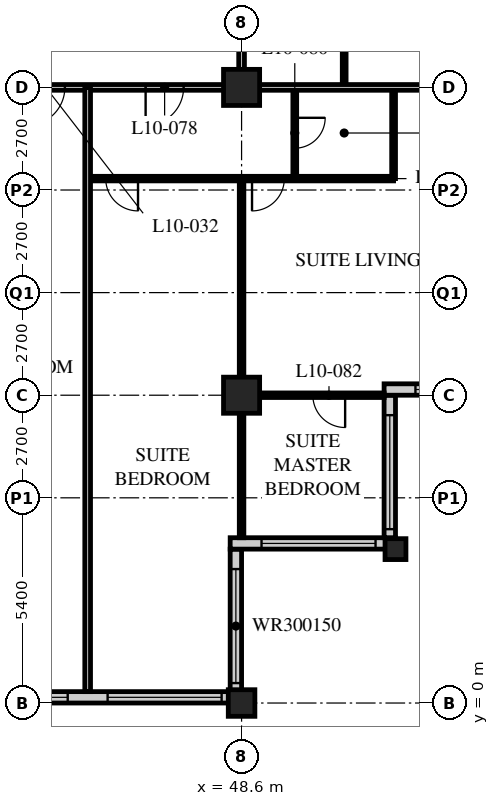
"""IFC4 building model, lengths in metres.
Left out: names, types, materials, properties, quantities, classifications, styles, units other than length and angle.
Written with IfcOpenShell. Run it as: python <this file> out.ifc"""

import sys

from ifc_helpers import new_model, si_unit, direction, frame, frame_2d, origin, origin_2d, place, context, subcontext, project, spatial, rectangle, hollow_rectangle, extrude, element, fill, save


model = new_model("IFC4")
c1 = context("Model", 3, precision=1e-05, world=origin(), true_north=direction((0.0, 1.0)))
c2 = subcontext(c1, "Body", "Model", "MODEL_VIEW")
j1 = project(units=[si_unit("LENGTHUNIT", "METRE"), si_unit("PLANEANGLEUNIT", "RADIAN")], contexts=[c1])
p1 = place(None, origin())
s1 = spatial("IfcSite", under=j1, at=p1, CompositionType="ELEMENT")
p2 = place(p1, origin())
s2 = spatial("IfcBuilding", under=s1, at=p2, CompositionType="ELEMENT")
p3 = place(p2, frame((0.0, 0.0, 46.6)))
s3 = spatial("IfcBuildingStorey", under=s2, at=p3, CompositionType="ELEMENT", Elevation=46.6)
p4 = place(p3, frame((48.6, 0.0, 0.0), z_axis=(0.0, 0.0, 1.0), x_axis=(1.0, 0.0, 0.0)))
e1 = element("IfcColumn", 1, at=p4, inside=s3, PredefinedType="COLUMN", context=c2, shape_type="SweptSolid", body=[
    extrude(hollow_rectangle(XDim=0.7, YDim=0.7, WallThickness=0.06, at=origin_2d()), origin(), (0.0, 0.0, 1.0), 3.4),
])
for number, where, z_axis, x_axis in (
    (2, (48.6, 8.1, 0.0), (0.0, 0.0, 1.0), (1.0, 0.0, 0.0)),
    (3, (48.6, 16.2, 0.0), (0.0, 0.0, 1.0), (1.0, 0.0, 0.0)),
):
    element("IfcColumn", number, at=place(p3, frame(where, z_axis=z_axis, x_axis=x_axis)), inside=s3, PredefinedType="COLUMN", context=c2, shape_type="SweptSolid", body=[
        extrude(hollow_rectangle(XDim=0.95, YDim=0.95, WallThickness=0.095, at=origin_2d()), origin(), (0.0, 0.0, 1.0), 3.4),
    ])
p5 = place(p3, frame((52.65, 4.05, 0.0), z_axis=(0.0, 0.0, 1.0), x_axis=(1.0, 0.0, 0.0)))
e4 = element("IfcColumn", 4, at=p5, inside=s3, PredefinedType="COLUMN", context=c2, shape_type="SweptSolid", body=[
    extrude(hollow_rectangle(XDim=0.55, YDim=0.55, WallThickness=0.05, at=origin_2d()), origin(), (0.0, 0.0, 1.0), 3.4),
])
p6 = place(p3, frame((8.4, 0.15, 0.0), z_axis=(0.0, 0.0, 1.0), x_axis=(1.0, 0.0, 0.0)))
e5 = element("IfcWall", 5, at=p6, inside=s3, PredefinedType="SOLIDWALL", context=c2, shape_type="SweptSolid", body=[
    extrude(rectangle(XDim=40.2, YDim=0.3, at=frame_2d((20.1, 0.0))), origin(), (0.0, 0.0, 1.0), 3.19),
])
p7 = place(p6, frame((0.225, 0.0, 0.9)))
e6 = element("IfcOpeningElement", 6, at=p7, cuts=e5, PredefinedType="OPENING", context=c2, shape_type="SweptSolid", body=[
    extrude(rectangle(XDim=3.0, YDim=2.0, at=frame_2d((1.5, 1.0))), frame((0.0, 0.16, 0.0), z_axis=(0.0, -1.0, 0.0), x_axis=(1.0, 0.0, 0.0)), (0.0, 0.0, 1.0), 0.32),
])
p8 = place(p6, frame((4.275, 0.0, 0.9)))
e7 = element("IfcOpeningElement", 7, at=p8, cuts=e5, PredefinedType="OPENING", context=c2, shape_type="SweptSolid", body=[
    extrude(rectangle(XDim=3.0, YDim=2.0, at=frame_2d((1.5, 1.0))), frame((0.0, 0.16, 0.0), z_axis=(0.0, -1.0, 0.0), x_axis=(1.0, 0.0, 0.0)), (0.0, 0.0, 1.0), 0.32),
])
p9 = place(p6, frame((8.325, 0.0, 0.9)))
e8 = element("IfcOpeningElement", 8, at=p9, cuts=e5, PredefinedType="OPENING", context=c2, shape_type="SweptSolid", body=[
    extrude(rectangle(XDim=3.0, YDim=2.0, at=frame_2d((1.5, 1.0))), frame((0.0, 0.16, 0.0), z_axis=(0.0, -1.0, 0.0), x_axis=(1.0, 0.0, 0.0)), (0.0, 0.0, 1.0), 0.32),
])
p10 = place(p6, frame((12.375, 0.0, 0.9)))
e9 = element("IfcOpeningElement", 9, at=p10, cuts=e5, PredefinedType="OPENING", context=c2, shape_type="SweptSolid", body=[
    extrude(rectangle(XDim=3.0, YDim=2.0, at=frame_2d((1.5, 1.0))), frame((0.0, 0.16, 0.0), z_axis=(0.0, -1.0, 0.0), x_axis=(1.0, 0.0, 0.0)), (0.0, 0.0, 1.0), 0.32),
])
p11 = place(p6, frame((16.425, 0.0, 0.9)))
e10 = element("IfcOpeningElement", 10, at=p11, cuts=e5, PredefinedType="OPENING", context=c2, shape_type="SweptSolid", body=[
    extrude(rectangle(XDim=3.0, YDim=2.0, at=frame_2d((1.5, 1.0))), frame((0.0, 0.16, 0.0), z_axis=(0.0, -1.0, 0.0), x_axis=(1.0, 0.0, 0.0)), (0.0, 0.0, 1.0), 0.32),
])
p12 = place(p6, frame((20.475, 0.0, 0.9)))
e11 = element("IfcOpeningElement", 11, at=p12, cuts=e5, PredefinedType="OPENING", context=c2, shape_type="SweptSolid", body=[
    extrude(rectangle(XDim=3.0, YDim=2.0, at=frame_2d((1.5, 1.0))), frame((0.0, 0.16, 0.0), z_axis=(0.0, -1.0, 0.0), x_axis=(1.0, 0.0, 0.0)), (0.0, 0.0, 1.0), 0.32),
])
p13 = place(p6, frame((24.525, 0.0, 0.9)))
e12 = element("IfcOpeningElement", 12, at=p13, cuts=e5, PredefinedType="OPENING", context=c2, shape_type="SweptSolid", body=[
    extrude(rectangle(XDim=3.0, YDim=2.0, at=frame_2d((1.5, 1.0))), frame((0.0, 0.16, 0.0), z_axis=(0.0, -1.0, 0.0), x_axis=(1.0, 0.0, 0.0)), (0.0, 0.0, 1.0), 0.32),
])
p14 = place(p6, frame((28.575, 0.0, 0.9)))
e13 = element("IfcOpeningElement", 13, at=p14, cuts=e5, PredefinedType="OPENING", context=c2, shape_type="SweptSolid", body=[
    extrude(rectangle(XDim=3.0, YDim=2.0, at=frame_2d((1.5, 1.0))), frame((0.0, 0.16, 0.0), z_axis=(0.0, -1.0, 0.0), x_axis=(1.0, 0.0, 0.0)), (0.0, 0.0, 1.0), 0.32),
])
p15 = place(p6, frame((32.625, 0.0, 0.9)))
e14 = element("IfcOpeningElement", 14, at=p15, cuts=e5, PredefinedType="OPENING", context=c2, shape_type="SweptSolid", body=[
    extrude(rectangle(XDim=3.0, YDim=2.0, at=frame_2d((1.5, 1.0))), frame((0.0, 0.16, 0.0), z_axis=(0.0, -1.0, 0.0), x_axis=(1.0, 0.0, 0.0)), (0.0, 0.0, 1.0), 0.32),
])
p16 = place(p6, frame((36.675, 0.0, 0.9)))
e15 = element("IfcOpeningElement", 15, at=p16, cuts=e5, PredefinedType="OPENING", context=c2, shape_type="SweptSolid", body=[
    extrude(rectangle(XDim=3.0, YDim=2.0, at=frame_2d((1.5, 1.0))), frame((0.0, 0.16, 0.0), z_axis=(0.0, -1.0, 0.0), x_axis=(1.0, 0.0, 0.0)), (0.0, 0.0, 1.0), 0.32),
])
p17 = place(p3, frame((48.45, 0.3, 0.0), z_axis=(0.0, 0.0, 1.0), x_axis=(0.0, 1.0, 0.0)))
e16 = element("IfcWall", 16, at=p17, inside=s3, PredefinedType="SOLIDWALL", context=c2, shape_type="SweptSolid", body=[
    extrude(rectangle(XDim=3.75, YDim=0.3, at=frame_2d((1.875, 0.0))), origin(), (0.0, 0.0, 1.0), 3.19),
])
p18 = place(p17, frame((0.225, 0.0, 0.9)))
e17 = element("IfcOpeningElement", 17, at=p18, cuts=e16, PredefinedType="OPENING", context=c2, shape_type="SweptSolid", body=[
    extrude(rectangle(XDim=3.0, YDim=1.5, at=frame_2d((1.5, 0.75))), frame((0.0, 0.16, 0.0), z_axis=(0.0, -1.0, 0.0), x_axis=(1.0, 0.0, 0.0)), (0.0, 0.0, 1.0), 0.32),
])
p19 = place(p3, frame((48.3, 4.2, 0.0), z_axis=(0.0, 0.0, 1.0), x_axis=(1.0, 0.0, 0.0)))
e18 = element("IfcWall", 18, at=p19, inside=s3, PredefinedType="SOLIDWALL", context=c2, shape_type="SweptSolid", body=[
    extrude(rectangle(XDim=4.35, YDim=0.3, at=frame_2d((2.175, 0.0))), origin(), (0.0, 0.0, 1.0), 3.19),
])
p20 = place(p19, frame((0.825, 0.0, 0.9)))
e19 = element("IfcOpeningElement", 19, at=p20, cuts=e18, PredefinedType="OPENING", context=c2, shape_type="SweptSolid", body=[
    extrude(rectangle(XDim=3.0, YDim=1.5, at=frame_2d((1.5, 0.75))), frame((0.0, 0.16, 0.0), z_axis=(0.0, -1.0, 0.0), x_axis=(1.0, 0.0, 0.0)), (0.0, 0.0, 1.0), 0.32),
])
p21 = place(p3, frame((52.5, 4.35, 0.0), z_axis=(0.0, 0.0, 1.0), x_axis=(0.0, 1.0, 0.0)))
e20 = element("IfcWall", 20, at=p21, inside=s3, PredefinedType="SOLIDWALL", context=c2, shape_type="SweptSolid", body=[
    extrude(rectangle(XDim=3.75, YDim=0.3, at=frame_2d((1.875, 0.0))), origin(), (0.0, 0.0, 1.0), 3.19),
])
p22 = place(p21, frame((0.225, 0.0, 0.9)))
e21 = element("IfcOpeningElement", 21, at=p22, cuts=e20, PredefinedType="OPENING", context=c2, shape_type="SweptSolid", body=[
    extrude(rectangle(XDim=3.0, YDim=1.5, at=frame_2d((1.5, 0.75))), frame((0.0, 0.16, 0.0), z_axis=(0.0, -1.0, 0.0), x_axis=(1.0, 0.0, 0.0)), (0.0, 0.0, 1.0), 0.32),
])
p23 = place(p3, frame((52.35, 8.25, 0.0), z_axis=(0.0, 0.0, 1.0), x_axis=(1.0, 0.0, 0.0)))
e22 = element("IfcWall", 22, at=p23, inside=s3, PredefinedType="SOLIDWALL", context=c2, shape_type="SweptSolid", body=[
    extrude(rectangle(XDim=4.35, YDim=0.3, at=frame_2d((2.175, 0.0))), origin(), (0.0, 0.0, 1.0), 3.19),
])
p24 = place(p23, frame((0.825, 0.0, 0.9)))
e23 = element("IfcOpeningElement", 23, at=p24, cuts=e22, PredefinedType="OPENING", context=c2, shape_type="SweptSolid", body=[
    extrude(rectangle(XDim=3.0, YDim=1.5, at=frame_2d((1.5, 0.75))), frame((0.0, 0.16, 0.0), z_axis=(0.0, -1.0, 0.0), x_axis=(1.0, 0.0, 0.0)), (0.0, 0.0, 1.0), 0.32),
])
p25 = place(p3, frame((8.1, 16.2, 0.0), z_axis=(0.0, 0.0, 1.0), x_axis=(1.0, 0.0, 0.0)))
e24 = element("IfcWall", 24, at=p25, inside=s3, PredefinedType="PARTITIONING", context=c2, shape_type="SweptSolid", body=[
    extrude(rectangle(XDim=40.5, YDim=0.15, at=frame_2d((20.25, 0.0))), origin(), (0.0, 0.0, 1.0), 2.578),
])
p26 = place(p25, frame((4.35, 0.0, 0.0)))
e25 = element("IfcOpeningElement", 25, at=p26, cuts=e24, PredefinedType="OPENING", context=c2, shape_type="SweptSolid", body=[
    extrude(rectangle(XDim=1.0, YDim=2.1, at=frame_2d((0.5, 1.05))), frame((0.0, 0.085, 0.0), z_axis=(0.0, -1.0, 0.0), x_axis=(1.0, 0.0, 0.0)), (0.0, 0.0, 1.0), 0.17),
])
p27 = place(p25, frame((10.85, 0.0, 0.0)))
e26 = element("IfcOpeningElement", 26, at=p27, cuts=e24, PredefinedType="OPENING", context=c2, shape_type="SweptSolid", body=[
    extrude(rectangle(XDim=1.0, YDim=2.1, at=frame_2d((0.5, 1.05))), frame((0.0, 0.085, 0.0), z_axis=(0.0, -1.0, 0.0), x_axis=(1.0, 0.0, 0.0)), (0.0, 0.0, 1.0), 0.17),
])
p28 = place(p25, frame((12.75, 0.0, 0.0)))
e27 = element("IfcOpeningElement", 27, at=p28, cuts=e24, PredefinedType="OPENING", context=c2, shape_type="SweptSolid", body=[
    extrude(rectangle(XDim=1.0, YDim=2.1, at=frame_2d((0.5, 1.05))), frame((0.0, 0.085, 0.0), z_axis=(0.0, -1.0, 0.0), x_axis=(1.0, 0.0, 0.0)), (0.0, 0.0, 1.0), 0.17),
])
p29 = place(p25, frame((18.95, 0.0, 0.0)))
e28 = element("IfcOpeningElement", 28, at=p29, cuts=e24, PredefinedType="OPENING", context=c2, shape_type="SweptSolid", body=[
    extrude(rectangle(XDim=1.0, YDim=2.1, at=frame_2d((0.5, 1.05))), frame((0.0, 0.085, 0.0), z_axis=(0.0, -1.0, 0.0), x_axis=(1.0, 0.0, 0.0)), (0.0, 0.0, 1.0), 0.17),
])
p30 = place(p25, frame((20.55, 0.0, 0.0)))
e29 = element("IfcOpeningElement", 29, at=p30, cuts=e24, PredefinedType="OPENING", context=c2, shape_type="SweptSolid", body=[
    extrude(rectangle(XDim=1.0, YDim=2.1, at=frame_2d((0.5, 1.05))), frame((0.0, 0.085, 0.0), z_axis=(0.0, -1.0, 0.0), x_axis=(1.0, 0.0, 0.0)), (0.0, 0.0, 1.0), 0.17),
])
p31 = place(p25, frame((27.05, 0.0, 0.0)))
e30 = element("IfcOpeningElement", 30, at=p31, cuts=e24, PredefinedType="OPENING", context=c2, shape_type="SweptSolid", body=[
    extrude(rectangle(XDim=1.0, YDim=2.1, at=frame_2d((0.5, 1.05))), frame((0.0, 0.085, 0.0), z_axis=(0.0, -1.0, 0.0), x_axis=(1.0, 0.0, 0.0)), (0.0, 0.0, 1.0), 0.17),
])
p32 = place(p25, frame((28.95, 0.0, 0.0)))
e31 = element("IfcOpeningElement", 31, at=p32, cuts=e24, PredefinedType="OPENING", context=c2, shape_type="SweptSolid", body=[
    extrude(rectangle(XDim=1.0, YDim=2.1, at=frame_2d((0.5, 1.05))), frame((0.0, 0.085, 0.0), z_axis=(0.0, -1.0, 0.0), x_axis=(1.0, 0.0, 0.0)), (0.0, 0.0, 1.0), 0.17),
])
p33 = place(p25, frame((34.85, 0.0, 0.0)))
e32 = element("IfcOpeningElement", 32, at=p33, cuts=e24, PredefinedType="OPENING", context=c2, shape_type="SweptSolid", body=[
    extrude(rectangle(XDim=1.0, YDim=2.1, at=frame_2d((0.5, 1.05))), frame((0.0, 0.085, 0.0), z_axis=(0.0, -1.0, 0.0), x_axis=(1.0, 0.0, 0.0)), (0.0, 0.0, 1.0), 0.17),
])
p34 = place(p25, frame((1.525, 0.0, 0.0)))
e33 = element("IfcOpeningElement", 33, at=p34, cuts=e24, PredefinedType="OPENING", context=c2, shape_type="SweptSolid", body=[
    extrude(rectangle(XDim=1.0, YDim=2.1, at=frame_2d((0.5, 1.05))), frame((0.0, 0.085, 0.0), z_axis=(0.0, -1.0, 0.0), x_axis=(1.0, 0.0, 0.0)), (0.0, 0.0, 1.0), 0.17),
])
p35 = place(p25, frame((37.975, 0.0, 0.0)))
e34 = element("IfcOpeningElement", 34, at=p35, cuts=e24, PredefinedType="OPENING", context=c2, shape_type="SweptSolid", body=[
    extrude(rectangle(XDim=1.0, YDim=2.1, at=frame_2d((0.5, 1.05))), frame((0.0, 0.085, 0.0), z_axis=(0.0, -1.0, 0.0), x_axis=(1.0, 0.0, 0.0)), (0.0, 0.0, 1.0), 0.17),
])
p36 = place(p3, frame((48.6, 16.2, 0.0), z_axis=(0.0, 0.0, 1.0), x_axis=(0.0, 1.0, 0.0)))
e35 = element("IfcWall", 35, at=p36, inside=s3, PredefinedType="PARTITIONING", context=c2, shape_type="SweptSolid", body=[
    extrude(rectangle(XDim=26.1, YDim=0.15, at=frame_2d((13.05, 0.0))), origin(), (0.0, 0.0, 1.0), 2.578),
])
p37 = place(p36, frame((2.75, 0.0, 0.0)))
e36 = element("IfcOpeningElement", 36, at=p37, cuts=e35, PredefinedType="OPENING", context=c2, shape_type="SweptSolid", body=[
    extrude(rectangle(XDim=1.0, YDim=2.1, at=frame_2d((0.5, 1.05))), frame((0.0, 0.085, 0.0), z_axis=(0.0, -1.0, 0.0), x_axis=(1.0, 0.0, 0.0)), (0.0, 0.0, 1.0), 0.17),
])
p38 = place(p36, frame((4.35, 0.0, 0.0)))
e37 = element("IfcOpeningElement", 37, at=p38, cuts=e35, PredefinedType="OPENING", context=c2, shape_type="SweptSolid", body=[
    extrude(rectangle(XDim=1.0, YDim=2.1, at=frame_2d((0.5, 1.05))), frame((0.0, 0.085, 0.0), z_axis=(0.0, -1.0, 0.0), x_axis=(1.0, 0.0, 0.0)), (0.0, 0.0, 1.0), 0.17),
])
p39 = place(p36, frame((10.85, 0.0, 0.0)))
e38 = element("IfcOpeningElement", 38, at=p39, cuts=e35, PredefinedType="OPENING", context=c2, shape_type="SweptSolid", body=[
    extrude(rectangle(XDim=1.0, YDim=2.1, at=frame_2d((0.5, 1.05))), frame((0.0, 0.085, 0.0), z_axis=(0.0, -1.0, 0.0), x_axis=(1.0, 0.0, 0.0)), (0.0, 0.0, 1.0), 0.17),
])
p40 = place(p36, frame((12.45, 0.0, 0.0)))
e39 = element("IfcOpeningElement", 39, at=p40, cuts=e35, PredefinedType="OPENING", context=c2, shape_type="SweptSolid", body=[
    extrude(rectangle(XDim=1.0, YDim=2.1, at=frame_2d((0.5, 1.05))), frame((0.0, 0.085, 0.0), z_axis=(0.0, -1.0, 0.0), x_axis=(1.0, 0.0, 0.0)), (0.0, 0.0, 1.0), 0.17),
])
p41 = place(p36, frame((18.65, 0.0, 0.0)))
e40 = element("IfcOpeningElement", 40, at=p41, cuts=e35, PredefinedType="OPENING", context=c2, shape_type="SweptSolid", body=[
    extrude(rectangle(XDim=1.0, YDim=2.1, at=frame_2d((0.5, 1.05))), frame((0.0, 0.085, 0.0), z_axis=(0.0, -1.0, 0.0), x_axis=(1.0, 0.0, 0.0)), (0.0, 0.0, 1.0), 0.17),
])
p42 = place(p36, frame((22.7, 0.0, 0.0)))
e41 = element("IfcOpeningElement", 41, at=p42, cuts=e35, PredefinedType="OPENING", context=c2, shape_type="SweptSolid", body=[
    extrude(rectangle(XDim=1.0, YDim=2.1, at=frame_2d((0.5, 1.05))), frame((0.0, 0.085, 0.0), z_axis=(0.0, -1.0, 0.0), x_axis=(1.0, 0.0, 0.0)), (0.0, 0.0, 1.0), 0.17),
])
p43 = place(p3, frame((51.3, 16.2, 0.0), z_axis=(0.0, 0.0, 1.0), x_axis=(0.0, 1.0, 0.0)))
e42 = element("IfcWall", 42, at=p43, inside=s3, PredefinedType="PARTITIONING", context=c2, shape_type="SweptSolid", body=[
    extrude(rectangle(XDim=2.6, YDim=0.1, at=frame_2d((1.3, 0.0))), origin(), (0.0, 0.0, 1.0), 3.19),
])
p44 = place(p3, frame((44.55, 13.8, 0.0), z_axis=(0.0, 0.0, 1.0), x_axis=(1.0, 0.0, 0.0)))
e43 = element("IfcWall", 43, at=p44, inside=s3, PredefinedType="PARTITIONING", context=c2, shape_type="SweptSolid", body=[
    extrude(rectangle(XDim=8.05, YDim=0.12, at=frame_2d((4.025, 0.0))), origin(), (0.0, 0.0, 1.0), 3.19),
])
p45 = place(p44, frame((0.475, 0.0, 0.0)))
e44 = element("IfcOpeningElement", 44, at=p45, cuts=e43, PredefinedType="OPENING", context=c2, shape_type="SweptSolid", body=[
    extrude(rectangle(XDim=0.85, YDim=2.1, at=frame_2d((0.425, 1.05))), frame((0.0, 0.07, 0.0), z_axis=(0.0, -1.0, 0.0), x_axis=(1.0, 0.0, 0.0)), (0.0, 0.0, 1.0), 0.14),
])
p46 = place(p44, frame((4.325, 0.0, 0.0)))
e45 = element("IfcOpeningElement", 45, at=p46, cuts=e43, PredefinedType="OPENING", context=c2, shape_type="SweptSolid", body=[
    extrude(rectangle(XDim=0.85, YDim=2.1, at=frame_2d((0.425, 1.05))), frame((0.0, 0.07, 0.0), z_axis=(0.0, -1.0, 0.0), x_axis=(1.0, 0.0, 0.0)), (0.0, 0.0, 1.0), 0.14),
])
p47 = place(p3, frame((50.0, 16.2, 0.0), z_axis=(0.0, 0.0, 1.0), x_axis=(0.0, -1.0, 0.0)))
e46 = element("IfcWall", 46, at=p47, inside=s3, PredefinedType="PARTITIONING", context=c2, shape_type="SweptSolid", body=[
    extrude(rectangle(XDim=2.4, YDim=0.1, at=frame_2d((1.2, 0.0))), origin(), (0.0, 0.0, 1.0), 3.19),
])
p48 = place(p47, frame((0.8, 0.0, 0.0)))
e47 = element("IfcOpeningElement", 47, at=p48, cuts=e46, PredefinedType="OPENING", context=c2, shape_type="SweptSolid", body=[
    extrude(rectangle(XDim=0.8, YDim=2.1, at=frame_2d((0.4, 1.05))), frame((0.0, 0.06, 0.0), z_axis=(0.0, -1.0, 0.0), x_axis=(1.0, 0.0, 0.0)), (0.0, 0.0, 1.0), 0.12),
])
p49 = place(p3, frame((52.6, 16.2, 0.0), z_axis=(0.0, 0.0, 1.0), x_axis=(0.0, -1.0, 0.0)))
e48 = element("IfcWall", 48, at=p49, inside=s3, PredefinedType="PARTITIONING", context=c2, shape_type="SweptSolid", body=[
    extrude(rectangle(XDim=2.4, YDim=0.1, at=frame_2d((1.2, 0.0))), origin(), (0.0, 0.0, 1.0), 3.19),
])
p50 = place(p3, frame((48.6, 13.8, 0.0), z_axis=(0.0, 0.0, 1.0), x_axis=(0.0, -1.0, 0.0)))
e49 = element("IfcWall", 49, at=p50, inside=s3, PredefinedType="PARTITIONING", context=c2, shape_type="SweptSolid", body=[
    extrude(rectangle(XDim=9.45, YDim=0.12, at=frame_2d((4.725, 0.0))), origin(), (0.0, 0.0, 1.0), 2.578),
])
p51 = place(p3, frame((48.6, 8.1, 0.0), z_axis=(0.0, 0.0, 1.0), x_axis=(1.0, 0.0, 0.0)))
e50 = element("IfcWall", 50, at=p51, inside=s3, PredefinedType="PARTITIONING", context=c2, shape_type="SweptSolid", body=[
    extrude(rectangle(XDim=3.75, YDim=0.12, at=frame_2d((1.875, 0.0))), origin(), (0.0, 0.0, 1.0), 2.578),
])
p52 = place(p51, frame((1.875, 0.0, 0.0)))
e51 = element("IfcOpeningElement", 51, at=p52, cuts=e50, PredefinedType="OPENING", context=c2, shape_type="SweptSolid", body=[
    extrude(rectangle(XDim=0.85, YDim=2.1, at=frame_2d((0.425, 1.05))), frame((0.0, 0.07, 0.0), z_axis=(0.0, -1.0, 0.0), x_axis=(1.0, 0.0, 0.0)), (0.0, 0.0, 1.0), 0.14),
])
p53 = place(p3, frame((48.6, 16.2, 0.0), z_axis=(0.0, 0.0, 1.0), x_axis=(1.0, 0.0, 0.0)))
e52 = element("IfcWall", 52, at=p53, inside=s3, PredefinedType="PARTITIONING", context=c2, shape_type="SweptSolid", body=[
    extrude(rectangle(XDim=7.8, YDim=0.15, at=frame_2d((3.9, 0.0))), origin(), (0.0, 0.0, 1.0), 2.578),
])
p54 = place(p3, frame((44.55, 16.2, 0.0), z_axis=(0.0, 0.0, 1.0), x_axis=(0.0, -1.0, 0.0)))
e53 = element("IfcWall", 53, at=p54, inside=s3, PredefinedType="PARTITIONING", context=c2, shape_type="SweptSolid", body=[
    extrude(rectangle(XDim=15.9, YDim=0.15, at=frame_2d((7.95, 0.0))), origin(), (0.0, 0.0, 1.0), 3.19),
])
p55 = place(p15, origin())
e54 = element("IfcWindow", 54, at=p55, inside=s3, PartitioningType="SINGLE_PANEL", PredefinedType="WINDOW", context=c2, shape_type="SweptSolid", body=[
    extrude(rectangle(XDim=3.0, YDim=2.0, at=frame_2d((1.5, 1.0))), frame((0.0, 0.03, 0.0), z_axis=(0.0, -1.0, 0.0), x_axis=(1.0, 0.0, 0.0)), (0.0, 0.0, 1.0), 0.06),
])
fill(e14, e54)
p56 = place(p16, origin())
e55 = element("IfcWindow", 55, at=p56, inside=s3, PartitioningType="SINGLE_PANEL", PredefinedType="WINDOW", context=c2, shape_type="SweptSolid", body=[
    extrude(rectangle(XDim=3.0, YDim=2.0, at=frame_2d((1.5, 1.0))), frame((0.0, 0.03, 0.0), z_axis=(0.0, -1.0, 0.0), x_axis=(1.0, 0.0, 0.0)), (0.0, 0.0, 1.0), 0.06),
])
fill(e15, e55)
p57 = place(p18, origin())
e56 = element("IfcWindow", 56, at=p57, inside=s3, PartitioningType="SINGLE_PANEL", PredefinedType="WINDOW", context=c2, shape_type="SweptSolid", body=[
    extrude(rectangle(XDim=3.0, YDim=1.5, at=frame_2d((1.5, 0.75))), frame((0.0, 0.03, 0.0), z_axis=(0.0, -1.0, 0.0), x_axis=(1.0, 0.0, 0.0)), (0.0, 0.0, 1.0), 0.06),
])
fill(e17, e56)
p58 = place(p20, origin())
e57 = element("IfcWindow", 57, at=p58, inside=s3, PartitioningType="SINGLE_PANEL", PredefinedType="WINDOW", context=c2, shape_type="SweptSolid", body=[
    extrude(rectangle(XDim=3.0, YDim=1.5, at=frame_2d((1.5, 0.75))), frame((0.0, 0.03, 0.0), z_axis=(0.0, -1.0, 0.0), x_axis=(1.0, 0.0, 0.0)), (0.0, 0.0, 1.0), 0.06),
])
fill(e19, e57)
p59 = place(p22, origin())
e58 = element("IfcWindow", 58, at=p59, inside=s3, PartitioningType="SINGLE_PANEL", PredefinedType="WINDOW", context=c2, shape_type="SweptSolid", body=[
    extrude(rectangle(XDim=3.0, YDim=1.5, at=frame_2d((1.5, 0.75))), frame((0.0, 0.03, 0.0), z_axis=(0.0, -1.0, 0.0), x_axis=(1.0, 0.0, 0.0)), (0.0, 0.0, 1.0), 0.06),
])
fill(e21, e58)
p60 = place(p24, origin())
e59 = element("IfcWindow", 59, at=p60, inside=s3, PartitioningType="SINGLE_PANEL", PredefinedType="WINDOW", context=c2, shape_type="SweptSolid", body=[
    extrude(rectangle(XDim=3.0, YDim=1.5, at=frame_2d((1.5, 0.75))), frame((0.0, 0.03, 0.0), z_axis=(0.0, -1.0, 0.0), x_axis=(1.0, 0.0, 0.0)), (0.0, 0.0, 1.0), 0.06),
])
fill(e23, e59)
p61 = place(p33, origin())
e60 = element("IfcDoor", 60, at=p61, inside=s3, OperationType="SINGLE_SWING_RIGHT", PredefinedType="DOOR", context=c2, shape_type="SweptSolid", body=[
    extrude(rectangle(XDim=1.0, YDim=2.1, at=frame_2d((0.5, 1.05))), frame((0.0, 0.025, 0.0), z_axis=(0.0, -1.0, 0.0), x_axis=(1.0, 0.0, 0.0)), (0.0, 0.0, 1.0), 0.05),
])
fill(e32, e60)
p62 = place(p35, origin())
e61 = element("IfcDoor", 61, at=p62, inside=s3, OperationType="SINGLE_SWING_RIGHT", PredefinedType="DOOR", context=c2, shape_type="SweptSolid", body=[
    extrude(rectangle(XDim=1.0, YDim=2.1, at=frame_2d((0.5, 1.05))), frame((0.0, 0.025, 0.0), z_axis=(0.0, -1.0, 0.0), x_axis=(1.0, 0.0, 0.0)), (0.0, 0.0, 1.0), 0.05),
])
fill(e34, e61)
p63 = place(p45, origin())
e62 = element("IfcDoor", 62, at=p63, inside=s3, OperationType="SINGLE_SWING_LEFT", PredefinedType="DOOR", context=c2, shape_type="SweptSolid", body=[
    extrude(rectangle(XDim=0.85, YDim=2.1, at=frame_2d((0.425, 1.05))), frame((0.0, 0.025, 0.0), z_axis=(0.0, -1.0, 0.0), x_axis=(1.0, 0.0, 0.0)), (0.0, 0.0, 1.0), 0.05),
])
fill(e44, e62)
p64 = place(p48, origin())
e63 = element("IfcDoor", 63, at=p64, inside=s3, OperationType="SINGLE_SWING_LEFT", PredefinedType="DOOR", context=c2, shape_type="SweptSolid", body=[
    extrude(rectangle(XDim=0.8, YDim=2.1, at=frame_2d((0.4, 1.05))), frame((0.0, 0.025, 0.0), z_axis=(0.0, -1.0, 0.0), x_axis=(1.0, 0.0, 0.0)), (0.0, 0.0, 1.0), 0.05),
])
fill(e47, e63)
p65 = place(p46, origin())
e64 = element("IfcDoor", 64, at=p65, inside=s3, OperationType="SINGLE_SWING_RIGHT", PredefinedType="DOOR", context=c2, shape_type="SweptSolid", body=[
    extrude(rectangle(XDim=0.85, YDim=2.1, at=frame_2d((0.425, 1.05))), frame((0.0, 0.025, 0.0), z_axis=(0.0, -1.0, 0.0), x_axis=(1.0, 0.0, 0.0)), (0.0, 0.0, 1.0), 0.05),
])
fill(e45, e64)
p66 = place(p52, origin())
e65 = element("IfcDoor", 65, at=p66, inside=s3, OperationType="SINGLE_SWING_LEFT", PredefinedType="DOOR", context=c2, shape_type="SweptSolid", body=[
    extrude(rectangle(XDim=0.85, YDim=2.1, at=frame_2d((0.425, 1.05))), frame((0.0, 0.025, 0.0), z_axis=(0.0, -1.0, 0.0), x_axis=(1.0, 0.0, 0.0)), (0.0, 0.0, 1.0), 0.05),
])
fill(e51, e65)
save(model, sys.argv[1])
